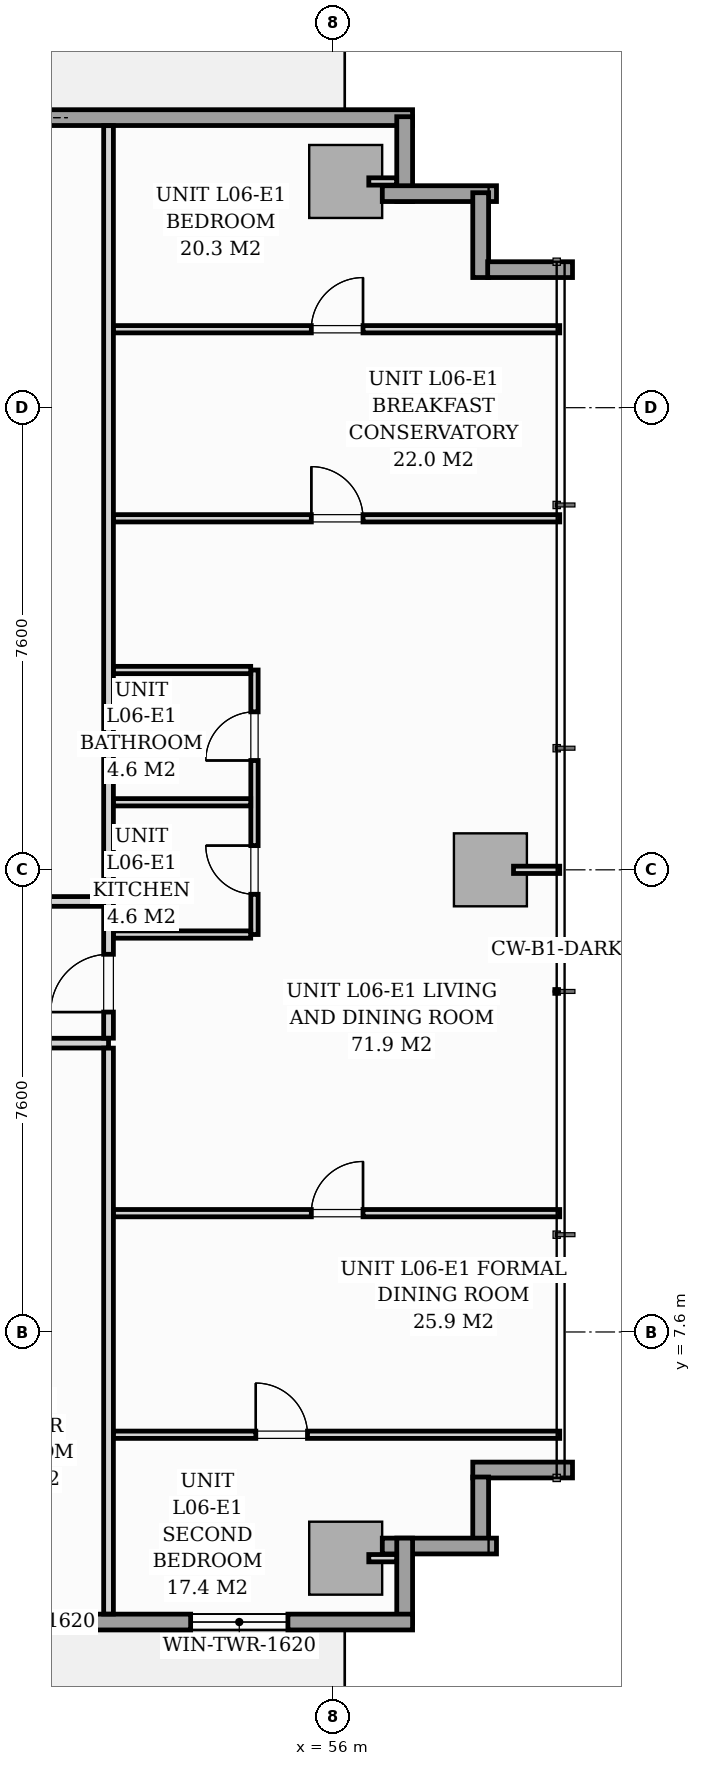
"""IFC4 building model, lengths in metres.
Left out: names, types, materials, properties, quantities, classifications, styles, units other than length and angle.
Written with IfcOpenShell. Run it as: python <this file> out.ifc"""

import sys

from ifc_helpers import new_model, si_unit, direction, frame, frame_2d, origin, origin_2d, place, context, subcontext, project, spatial, rectangle, extrude, source, transform, mapped, element, fill, save


model = new_model("IFC4")
c1 = context("Model", 3, precision=1e-05, world=origin(), true_north=direction((0.0, 1.0)))
c2 = subcontext(c1, "Body", "Model", "MODEL_VIEW")
j1 = project(units=[si_unit("LENGTHUNIT", "METRE"), si_unit("PLANEANGLEUNIT", "RADIAN")], contexts=[c1])
p1 = place(None, origin())
s1 = spatial("IfcSite", under=j1, at=p1, CompositionType="ELEMENT")
p2 = place(p1, origin())
s2 = spatial("IfcBuilding", under=s1, at=p2, CompositionType="ELEMENT")
p3 = place(p2, frame((0.0, 0.0, 26.2)))
s3 = spatial("IfcBuildingStorey", under=s2, at=p3, CompositionType="ELEMENT", Elevation=26.2)
m1 = source(origin(), c2, "Body", "SweptSolid", [
    extrude(rectangle(XDim=1.2, YDim=1.2, at=origin_2d()), origin(), (0.0, 0.0, 1.0), 3.196),
])
for number, where, z_axis, x_axis in (
    (1, (56.2, 3.88, 0.002), (0.0, 0.0, 1.0), (1.0, 0.0, 0.0)),
    (2, (56.2, 26.52, 0.002), (0.0, 0.0, 1.0), (1.0, 0.0, 0.0)),
    (3, (58.58, 15.2, 0.002), (0.0, 0.0, 1.0), (1.0, 0.0, 0.0)),
):
    element("IfcColumn", number, at=place(p3, frame(where, z_axis=z_axis, x_axis=x_axis)), inside=s3, PredefinedType="COLUMN", context=c2, shape_type="MappedRepresentation", body=[
        mapped(m1, transform((0.0, 0.0, 0.0), scale=1.0)),
    ])
p4 = place(p3, frame((40.15, 27.57, 0.0), z_axis=(0.0, 0.0, 1.0), x_axis=(1.0, 0.0, 0.0)))
e4 = element("IfcWall", 4, at=p4, inside=s3, PredefinedType="STANDARD", context=c2, shape_type="SweptSolid", body=[
    extrude(rectangle(XDim=17.15, YDim=0.26, at=frame_2d((8.575, 0.0))), origin(), (0.0, 0.0, 1.0), 2.94),
])
p5 = place(p4, frame((8.87, 0.0, 0.0)))
e5 = element("IfcOpeningElement", 5, at=p5, cuts=e4, PredefinedType="OPENING", context=c2, shape_type="SweptSolid", body=[
    extrude(rectangle(XDim=1.8, YDim=2.06, at=frame_2d((0.9, 1.03))), frame((0.0, 0.14, 0.0), z_axis=(0.0, -1.0, 0.0), x_axis=(1.0, 0.0, 0.0)), (0.0, 0.0, 1.0), 0.28),
])
p6 = place(p4, frame((0.7, 0.0, 0.65)))
e6 = element("IfcOpeningElement", 6, at=p6, cuts=e4, PredefinedType="OPENING", context=c2, shape_type="SweptSolid", body=[
    extrude(rectangle(XDim=1.6, YDim=1.5, at=frame_2d((0.8, 0.75))), frame((0.0, 0.14, 0.0), z_axis=(0.0, -1.0, 0.0), x_axis=(1.0, 0.0, 0.0)), (0.0, 0.0, 1.0), 0.28),
])
p7 = place(p3, frame((57.17, 27.585, 0.0), z_axis=(0.0, 0.0, 1.0), x_axis=(0.0, -1.0, 0.0)))
e7 = element("IfcWall", 7, at=p7, inside=s3, PredefinedType="STANDARD", context=c2, shape_type="SweptSolid", body=[
    extrude(rectangle(XDim=1.395, YDim=0.26, at=frame_2d((0.698, 0.0))), origin(), (0.0, 0.0, 1.0), 2.94),
])
p8 = place(p3, frame((56.802, 26.32, 0.0), z_axis=(0.0, 0.0, 1.0), x_axis=(1.0, 0.0, 0.0)))
e8 = element("IfcWall", 8, at=p8, inside=s3, PredefinedType="STANDARD", context=c2, shape_type="SweptSolid", body=[
    extrude(rectangle(XDim=1.878, YDim=0.26, at=frame_2d((0.939, 0.0))), origin(), (0.0, 0.0, 1.0), 2.94),
])
for number, where, z_axis, x_axis in (
    (9, (58.42, 26.335, 0.0), (0.0, 0.0, 1.0), (0.0, -1.0, 0.0)),
    (10, (58.535, 25.07, 0.0), (0.0, 0.0, 1.0), (1.0, 0.0, 0.0)),
):
    element("IfcWall", number, at=place(p3, frame(where, z_axis=z_axis, x_axis=x_axis)), inside=s3, PredefinedType="STANDARD", context=c2, shape_type="SweptSolid", body=[
        extrude(rectangle(XDim=1.395, YDim=0.26, at=frame_2d((0.698, 0.0))), origin(), (0.0, 0.0, 1.0), 2.94),
    ])
p9 = place(p3, frame((59.93, 5.33, 0.0), z_axis=(0.0, 0.0, 1.0), x_axis=(-1.0, 0.0, 0.0)))
e11 = element("IfcWall", 11, at=p9, inside=s3, PredefinedType="STANDARD", context=c2, shape_type="SweptSolid", body=[
    extrude(rectangle(XDim=1.64, YDim=0.26, at=frame_2d((0.82, 0.0))), origin(), (0.0, 0.0, 1.0), 2.94),
])
p10 = place(p3, frame((58.42, 5.215, 0.0), z_axis=(0.0, 0.0, 1.0), x_axis=(0.0, -1.0, 0.0)))
e12 = element("IfcWall", 12, at=p10, inside=s3, PredefinedType="STANDARD", context=c2, shape_type="SweptSolid", body=[
    extrude(rectangle(XDim=1.15, YDim=0.26, at=frame_2d((0.575, 0.0))), origin(), (0.0, 0.0, 1.0), 2.94),
])
p11 = place(p3, frame((58.68, 4.08, 0.0), z_axis=(0.0, 0.0, 1.0), x_axis=(-1.0, 0.0, 0.0)))
e13 = element("IfcWall", 13, at=p11, inside=s3, PredefinedType="STANDARD", context=c2, shape_type="SweptSolid", body=[
    extrude(rectangle(XDim=1.878, YDim=0.26, at=frame_2d((0.939, 0.0))), origin(), (0.0, 0.0, 1.0), 2.94),
])
p12 = place(p3, frame((57.17, 4.21, 0.0), z_axis=(0.0, 0.0, 1.0), x_axis=(0.0, -1.0, 0.0)))
e14 = element("IfcWall", 14, at=p12, inside=s3, PredefinedType="STANDARD", context=c2, shape_type="SweptSolid", body=[
    extrude(rectangle(XDim=1.395, YDim=0.26, at=frame_2d((0.698, 0.0))), origin(), (0.0, 0.0, 1.0), 2.94),
])
p13 = place(p3, frame((57.3, 2.83, 0.0), z_axis=(0.0, 0.0, 1.0), x_axis=(-1.0, 0.0, 0.0)))
e15 = element("IfcWall", 15, at=p13, inside=s3, PredefinedType="STANDARD", context=c2, shape_type="SweptSolid", body=[
    extrude(rectangle(XDim=17.15, YDim=0.26, at=frame_2d((8.575, 0.0))), origin(), (0.0, 0.0, 1.0), 2.94),
])
p14 = place(p13, frame((8.314, 0.0, 0.0)))
e16 = element("IfcOpeningElement", 16, at=p14, cuts=e15, PredefinedType="OPENING", context=c2, shape_type="SweptSolid", body=[
    extrude(rectangle(XDim=1.8, YDim=2.06, at=frame_2d((0.9, 1.03))), frame((0.0, 0.14, 0.0), z_axis=(0.0, -1.0, 0.0), x_axis=(1.0, 0.0, 0.0)), (0.0, 0.0, 1.0), 0.28),
])
p15 = place(p13, frame((2.05, 0.0, 0.65)))
e17 = element("IfcOpeningElement", 17, at=p15, cuts=e15, PredefinedType="OPENING", context=c2, shape_type="SweptSolid", body=[
    extrude(rectangle(XDim=1.6, YDim=1.5, at=frame_2d((0.8, 0.75))), frame((0.0, 0.14, 0.0), z_axis=(0.0, -1.0, 0.0), x_axis=(1.0, 0.0, 0.0)), (0.0, 0.0, 1.0), 0.28),
])
p16 = place(p13, frame((5.675, 0.0, 0.75)))
e18 = element("IfcOpeningElement", 18, at=p16, cuts=e15, PredefinedType="OPENING", context=c2, shape_type="SweptSolid", body=[
    extrude(rectangle(XDim=1.6, YDim=1.5, at=frame_2d((0.8, 0.75))), frame((0.0, 0.14, 0.0), z_axis=(0.0, -1.0, 0.0), x_axis=(1.0, 0.0, 0.0)), (0.0, 0.0, 1.0), 0.28),
])
p17 = place(p3, frame((15.2, 12.35, 0.0), z_axis=(0.0, 0.0, 1.0), x_axis=(1.0, 0.0, 0.0)))
e19 = element("IfcWall", 19, at=p17, inside=s3, PredefinedType="PARTITIONING", context=c2, shape_type="SweptSolid", body=[
    extrude(rectangle(XDim=37.1, YDim=0.16, at=frame_2d((18.55, 0.0))), origin(), (0.0, 0.0, 1.0), 2.94),
])
p18 = place(p17, frame((2.964, 0.0, 0.0)))
e20 = element("IfcOpeningElement", 20, at=p18, cuts=e19, PredefinedType="OPENING", context=c2, shape_type="SweptSolid", body=[
    extrude(rectangle(XDim=0.95, YDim=2.06, at=frame_2d((0.475, 1.03))), frame((0.0, 0.09, 0.0), z_axis=(0.0, -1.0, 0.0), x_axis=(1.0, 0.0, 0.0)), (0.0, 0.0, 1.0), 0.18),
])
p19 = place(p17, frame((28.202, 0.0, 0.0)))
e21 = element("IfcOpeningElement", 21, at=p19, cuts=e19, PredefinedType="OPENING", context=c2, shape_type="SweptSolid", body=[
    extrude(rectangle(XDim=0.95, YDim=2.06, at=frame_2d((0.475, 1.03))), frame((0.0, 0.09, 0.0), z_axis=(0.0, -1.0, 0.0), x_axis=(1.0, 0.0, 0.0)), (0.0, 0.0, 1.0), 0.18),
])
p20 = place(p3, frame((52.3, 2.962, 0.0), z_axis=(0.0, 0.0, 1.0), x_axis=(0.0, 1.0, 0.0)))
e22 = element("IfcWall", 22, at=p20, inside=s3, PredefinedType="PARTITIONING", context=c2, shape_type="SweptSolid", body=[
    extrude(rectangle(XDim=9.306, YDim=0.16, at=frame_2d((4.653, 0.0))), origin(), (0.0, 0.0, 1.0), 2.94),
])
p21 = place(p3, frame((52.3, 12.432, 0.0), z_axis=(0.0, 0.0, 1.0), x_axis=(0.0, 1.0, 0.0)))
e23 = element("IfcWall", 23, at=p21, inside=s3, PredefinedType="PARTITIONING", context=c2, shape_type="SweptSolid", body=[
    extrude(rectangle(XDim=15.006, YDim=0.16, at=frame_2d((7.503, 0.0))), origin(), (0.0, 0.0, 1.0), 2.94),
])
p22 = place(p21, frame((0.429, 0.0, 0.0)))
e24 = element("IfcOpeningElement", 24, at=p22, cuts=e23, PredefinedType="OPENING", context=c2, shape_type="SweptSolid", body=[
    extrude(rectangle(XDim=0.95, YDim=2.06, at=frame_2d((0.475, 1.03))), frame((0.0, 0.09, 0.0), z_axis=(0.0, -1.0, 0.0), x_axis=(1.0, 0.0, 0.0)), (0.0, 0.0, 1.0), 0.18),
])
p23 = place(p3, frame((54.7, 14.136, 0.0), z_axis=(0.0, 0.0, 1.0), x_axis=(0.0, 1.0, 0.0)))
e25 = element("IfcWall", 25, at=p23, inside=s3, PredefinedType="PARTITIONING", context=c2, shape_type="SweptSolid", body=[
    extrude(rectangle(XDim=4.35, YDim=0.12, at=frame_2d((2.175, 0.0))), origin(), (0.0, 0.0, 1.0), 2.94),
])
p24 = place(p23, frame((0.662, 0.0, 0.0)))
e26 = element("IfcOpeningElement", 26, at=p24, cuts=e25, PredefinedType="OPENING", context=c2, shape_type="SweptSolid", body=[
    extrude(rectangle(XDim=0.8, YDim=2.0, at=frame_2d((0.4, 1.0))), frame((0.0, 0.07, 0.0), z_axis=(0.0, -1.0, 0.0), x_axis=(1.0, 0.0, 0.0)), (0.0, 0.0, 1.0), 0.14),
])
p25 = place(p23, frame((2.862, 0.0, 0.0)))
e27 = element("IfcOpeningElement", 27, at=p25, cuts=e25, PredefinedType="OPENING", context=c2, shape_type="SweptSolid", body=[
    extrude(rectangle(XDim=0.8, YDim=2.02, at=frame_2d((0.4, 1.01))), frame((0.0, 0.07, 0.0), z_axis=(0.0, -1.0, 0.0), x_axis=(1.0, 0.0, 0.0)), (0.0, 0.0, 1.0), 0.14),
])
p26 = place(p3, frame((52.382, 16.311, 0.0), z_axis=(0.0, 0.0, 1.0), x_axis=(1.0, 0.0, 0.0)))
e28 = element("IfcWall", 28, at=p26, inside=s3, PredefinedType="PARTITIONING", context=c2, shape_type="SweptSolid", body=[
    extrude(rectangle(XDim=2.256, YDim=0.12, at=frame_2d((1.128, 0.0))), origin(), (0.0, 0.0, 1.0), 2.045),
])
for number, where, z_axis, x_axis in (
    (29, (52.382, 14.136, 0.0), (0.0, 0.0, 1.0), (1.0, 0.0, 0.0)),
    (30, (52.382, 18.486, 0.0), (0.0, 0.0, 1.0), (1.0, 0.0, 0.0)),
):
    element("IfcWall", number, at=place(p3, frame(where, z_axis=z_axis, x_axis=x_axis)), inside=s3, PredefinedType="PARTITIONING", context=c2, shape_type="SweptSolid", body=[
        extrude(rectangle(XDim=2.256, YDim=0.12, at=frame_2d((1.128, 0.0))), origin(), (0.0, 0.0, 1.0), 2.94),
    ])
p27 = place(p3, frame((52.382, 24.09, 0.0), z_axis=(0.0, 0.0, 1.0), x_axis=(1.0, 0.0, 0.0)))
e31 = element("IfcWall", 31, at=p27, inside=s3, PredefinedType="PARTITIONING", context=c2, shape_type="SweptSolid", body=[
    extrude(rectangle(XDim=7.338, YDim=0.12, at=frame_2d((3.669, 0.0))), origin(), (0.0, 0.0, 1.0), 2.94),
])
p28 = place(p27, frame((3.253, 0.0, 0.0)))
e32 = element("IfcOpeningElement", 32, at=p28, cuts=e31, PredefinedType="OPENING", context=c2, shape_type="SweptSolid", body=[
    extrude(rectangle(XDim=0.85, YDim=2.05, at=frame_2d((0.425, 1.025))), frame((0.0, 0.07, 0.0), z_axis=(0.0, -1.0, 0.0), x_axis=(1.0, 0.0, 0.0)), (0.0, 0.0, 1.0), 0.14),
])
p29 = place(p3, frame((52.382, 5.91, 0.0), z_axis=(0.0, 0.0, 1.0), x_axis=(1.0, 0.0, 0.0)))
e33 = element("IfcWall", 33, at=p29, inside=s3, PredefinedType="PARTITIONING", context=c2, shape_type="SweptSolid", body=[
    extrude(rectangle(XDim=7.338, YDim=0.12, at=frame_2d((3.669, 0.0))), origin(), (0.0, 0.0, 1.0), 2.94),
])
p30 = place(p29, frame((2.34, 0.0, 0.0)))
e34 = element("IfcOpeningElement", 34, at=p30, cuts=e33, PredefinedType="OPENING", context=c2, shape_type="SweptSolid", body=[
    extrude(rectangle(XDim=0.85, YDim=2.05, at=frame_2d((0.425, 1.025))), frame((0.0, 0.07, 0.0), z_axis=(0.0, -1.0, 0.0), x_axis=(1.0, 0.0, 0.0)), (0.0, 0.0, 1.0), 0.14),
])
p31 = place(p3, frame((52.382, 9.554, 0.0), z_axis=(0.0, 0.0, 1.0), x_axis=(1.0, 0.0, 0.0)))
e35 = element("IfcWall", 35, at=p31, inside=s3, PredefinedType="PARTITIONING", context=c2, shape_type="SweptSolid", body=[
    extrude(rectangle(XDim=7.338, YDim=0.12, at=frame_2d((3.669, 0.0))), origin(), (0.0, 0.0, 1.0), 2.94),
])
p32 = place(p31, frame((3.253, 0.0, 0.0)))
e36 = element("IfcOpeningElement", 36, at=p32, cuts=e35, PredefinedType="OPENING", context=c2, shape_type="SweptSolid", body=[
    extrude(rectangle(XDim=0.85, YDim=2.05, at=frame_2d((0.425, 1.025))), frame((0.0, 0.07, 0.0), z_axis=(0.0, -1.0, 0.0), x_axis=(1.0, 0.0, 0.0)), (0.0, 0.0, 1.0), 0.14),
])
p33 = place(p3, frame((52.382, 20.981, 0.0), z_axis=(0.0, 0.0, 1.0), x_axis=(1.0, 0.0, 0.0)))
e37 = element("IfcWall", 37, at=p33, inside=s3, PredefinedType="PARTITIONING", context=c2, shape_type="SweptSolid", body=[
    extrude(rectangle(XDim=7.338, YDim=0.12, at=frame_2d((3.669, 0.0))), origin(), (0.0, 0.0, 1.0), 2.94),
])
p34 = place(p33, frame((3.253, 0.0, 0.0)))
e38 = element("IfcOpeningElement", 38, at=p34, cuts=e37, PredefinedType="OPENING", context=c2, shape_type="SweptSolid", body=[
    extrude(rectangle(XDim=0.85, YDim=2.05, at=frame_2d((0.425, 1.025))), frame((0.0, 0.07, 0.0), z_axis=(0.0, -1.0, 0.0), x_axis=(1.0, 0.0, 0.0)), (0.0, 0.0, 1.0), 0.14),
])
p35 = place(p3, frame((45.84, 14.68, 0.0), z_axis=(0.0, 0.0, 1.0), x_axis=(1.0, 0.0, 0.0)))
e39 = element("IfcWall", 39, at=p35, inside=s3, PredefinedType="PARTITIONING", context=c2, shape_type="SweptSolid", body=[
    extrude(rectangle(XDim=6.378, YDim=0.16, at=frame_2d((3.189, 0.0))), origin(), (0.0, 0.0, 1.0), 2.94),
])
p36 = place(p35, frame((2.815, 0.0, 0.0)))
e40 = element("IfcOpeningElement", 40, at=p36, cuts=e39, PredefinedType="OPENING", context=c2, shape_type="SweptSolid", body=[
    extrude(rectangle(XDim=0.95, YDim=2.06, at=frame_2d((0.475, 1.03))), frame((0.0, 0.09, 0.0), z_axis=(0.0, -1.0, 0.0), x_axis=(1.0, 0.0, 0.0)), (0.0, 0.0, 1.0), 0.18),
])
for number, where, z_axis, x_axis in (
    (41, (56.58, 3.88, 0.0), (0.0, 0.0, 1.0), (1.0, 0.0, 0.0)),
    (42, (56.58, 26.52, 0.0), (0.0, 0.0, 1.0), (1.0, 0.0, 0.0)),
):
    element("IfcWall", number, at=place(p3, frame(where, z_axis=z_axis, x_axis=x_axis)), inside=s3, PredefinedType="PARTITIONING", context=c2, shape_type="SweptSolid", body=[
        extrude(rectangle(XDim=0.458, YDim=0.12, at=frame_2d((0.229, 0.0))), origin(), (0.0, 0.0, 1.0), 2.94),
    ])
p37 = place(p3, frame((58.96, 15.2, 0.0), z_axis=(0.0, 0.0, 1.0), x_axis=(1.0, 0.0, 0.0)))
e43 = element("IfcWall", 43, at=p37, inside=s3, PredefinedType="PARTITIONING", context=c2, shape_type="SweptSolid", body=[
    extrude(rectangle(XDim=0.76, YDim=0.12, at=frame_2d((0.38, 0.0))), origin(), (0.0, 0.0, 1.0), 2.94),
])
m2 = source(origin(), c2, "Body", "SweptSolid", [
    extrude(rectangle(XDim=1.6, YDim=1.5, at=frame_2d((0.8, 0.75))), frame((0.0, 0.03, 0.0), z_axis=(0.0, -1.0, 0.0), x_axis=(1.0, 0.0, 0.0)), (0.0, 0.0, 1.0), 0.06),
])
p38 = place(p15, origin())
e44 = element("IfcWindow", 44, at=p38, inside=s3, PartitioningType="SINGLE_PANEL", PredefinedType="WINDOW", context=c2, shape_type="MappedRepresentation", body=[
    mapped(m2, transform((0.0, 0.0, 0.0), scale=1.0)),
])
fill(e17, e44)
p39 = place(p16, origin())
e45 = element("IfcWindow", 45, at=p39, inside=s3, PartitioningType="SINGLE_PANEL", PredefinedType="WINDOW", context=c2, shape_type="MappedRepresentation", body=[
    mapped(m2, transform((0.0, 0.0, 0.0), scale=1.0)),
])
fill(e18, e45)
m3 = source(origin(), c2, "Body", "SweptSolid", [
    extrude(rectangle(XDim=0.95, YDim=2.06, at=frame_2d((0.475, 1.03))), frame((0.0, 0.025, 0.0), z_axis=(0.0, -1.0, 0.0), x_axis=(1.0, 0.0, 0.0)), (0.0, 0.0, 1.0), 0.05),
])
p40 = place(p22, origin())
e46 = element("IfcDoor", 46, at=p40, inside=s3, OperationType="SINGLE_SWING_LEFT", PredefinedType="DOOR", context=c2, shape_type="MappedRepresentation", body=[
    mapped(m3, transform((0.0, 0.0, 0.0), scale=1.0)),
])
fill(e24, e46)
m4 = source(origin(), c2, "Body", "SweptSolid", [
    extrude(rectangle(XDim=0.8, YDim=2.0, at=frame_2d((0.4, 1.0))), frame((0.0, 0.025, 0.0), z_axis=(0.0, -1.0, 0.0), x_axis=(1.0, 0.0, 0.0)), (0.0, 0.0, 1.0), 0.05),
])
p41 = place(p24, origin())
e47 = element("IfcDoor", 47, at=p41, inside=s3, OperationType="SINGLE_SWING_RIGHT", PredefinedType="DOOR", context=c2, shape_type="MappedRepresentation", body=[
    mapped(m4, transform((0.0, 0.0, 0.0), scale=1.0)),
])
fill(e26, e47)
m5 = source(origin(), c2, "Body", "SweptSolid", [
    extrude(rectangle(XDim=0.8, YDim=2.02, at=frame_2d((0.4, 1.01))), frame((0.0, 0.025, 0.0), z_axis=(0.0, -1.0, 0.0), x_axis=(1.0, 0.0, 0.0)), (0.0, 0.0, 1.0), 0.05),
])
p42 = place(p25, origin())
e48 = element("IfcDoor", 48, at=p42, inside=s3, OperationType="SINGLE_SWING_LEFT", PredefinedType="DOOR", context=c2, shape_type="MappedRepresentation", body=[
    mapped(m5, transform((0.0, 0.0, 0.0), scale=1.0)),
])
fill(e27, e48)
m6 = source(origin(), c2, "Body", "SweptSolid", [
    extrude(rectangle(XDim=0.85, YDim=2.05, at=frame_2d((0.425, 1.025))), frame((0.0, 0.025, 0.0), z_axis=(0.0, -1.0, 0.0), x_axis=(1.0, 0.0, 0.0)), (0.0, 0.0, 1.0), 0.05),
])
p43 = place(p28, origin())
e49 = element("IfcDoor", 49, at=p43, inside=s3, OperationType="SINGLE_SWING_RIGHT", PredefinedType="DOOR", context=c2, shape_type="MappedRepresentation", body=[
    mapped(m6, transform((0.0, 0.0, 0.0), scale=1.0)),
])
fill(e32, e49)
p44 = place(p30, origin())
e50 = element("IfcDoor", 50, at=p44, inside=s3, OperationType="SINGLE_SWING_LEFT", PredefinedType="DOOR", context=c2, shape_type="MappedRepresentation", body=[
    mapped(m6, transform((0.0, 0.0, 0.0), scale=1.0)),
])
fill(e34, e50)
p45 = place(p32, origin())
e51 = element("IfcDoor", 51, at=p45, inside=s3, OperationType="SINGLE_SWING_RIGHT", PredefinedType="DOOR", context=c2, shape_type="MappedRepresentation", body=[
    mapped(m6, transform((0.0, 0.0, 0.0), scale=1.0)),
])
fill(e36, e51)
p46 = place(p34, origin())
e52 = element("IfcDoor", 52, at=p46, inside=s3, OperationType="SINGLE_SWING_LEFT", PredefinedType="DOOR", context=c2, shape_type="MappedRepresentation", body=[
    mapped(m6, transform((0.0, 0.0, 0.0), scale=1.0)),
])
fill(e38, e52)
save(model, sys.argv[1])
